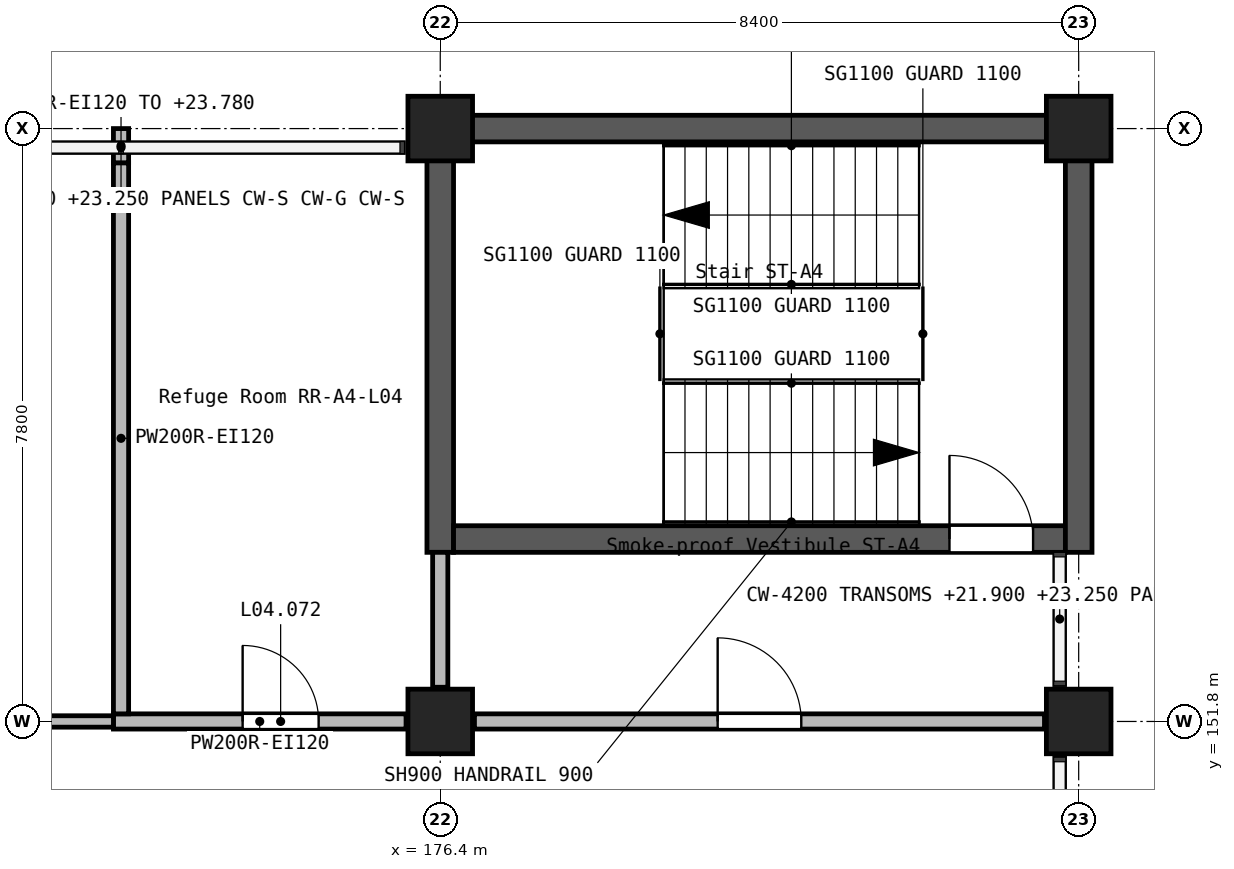
"""IFC4 building model, lengths in metres.
Left out: names, types, materials, properties, quantities, classifications, styles, units other than length and angle.
Written with IfcOpenShell. Run it as: python <this file> out.ifc"""

import sys

from ifc_helpers import new_model, si_unit, direction, frame, frame_2d, origin, origin_2d, place, context, subcontext, project, spatial, rectangle, extrude, element, fill, save


model = new_model("IFC4")
c1 = context("Model", 3, precision=1e-05, world=origin(), true_north=direction((0.0, 1.0)))
c2 = subcontext(c1, "Body", "Model", "MODEL_VIEW")
j1 = project(units=[si_unit("LENGTHUNIT", "METRE"), si_unit("PLANEANGLEUNIT", "RADIAN")], contexts=[c1])
p1 = place(None, origin())
s1 = spatial("IfcSite", under=j1, at=p1, CompositionType="ELEMENT")
p2 = place(p1, origin())
s2 = spatial("IfcBuilding", under=s1, at=p2, CompositionType="ELEMENT")
p3 = place(p2, frame((0.0, 0.0, 21.0)))
s3 = spatial("IfcBuildingStorey", under=s2, at=p3, CompositionType="ELEMENT", Elevation=21.0)
for number, where, z_axis, x_axis in (
    (1, (176.4, 151.8, 0.0), (0.0, 0.0, 1.0), (1.0, 0.0, 0.0)),
    (2, (176.4, 159.6, 0.0), (0.0, 0.0, 1.0), (1.0, 0.0, 0.0)),
    (3, (184.8, 151.8, 0.0), (0.0, 0.0, 1.0), (1.0, 0.0, 0.0)),
    (4, (184.8, 159.6, 0.0), (0.0, 0.0, 1.0), (1.0, 0.0, 0.0)),
):
    element("IfcColumn", number, at=place(p3, frame(where, z_axis=z_axis, x_axis=x_axis)), inside=s3, PredefinedType="COLUMN", context=c2, shape_type="SweptSolid", body=[
        extrude(rectangle(XDim=0.85, YDim=0.85, at=origin_2d()), origin(), (0.0, 0.0, 1.0), 3.9),
    ])
p4 = place(p3, frame((176.225, 159.6, 0.0), z_axis=(0.0, 0.0, 1.0), x_axis=(1.0, 0.0, 0.0)))
e5 = element("IfcWall", 5, at=p4, inside=s3, PredefinedType="SHEAR", context=c2, shape_type="SweptSolid", body=[
    extrude(rectangle(XDim=8.4, YDim=0.35, at=frame_2d((4.2, 0.0))), origin(), (0.0, 0.0, 1.0), 3.9),
])
p5 = place(p3, frame((176.4, 154.025, 0.0), z_axis=(0.0, 0.0, 1.0), x_axis=(0.0, 1.0, 0.0)))
e6 = element("IfcWall", 6, at=p5, inside=s3, PredefinedType="SHEAR", context=c2, shape_type="SweptSolid", body=[
    extrude(rectangle(XDim=5.4, YDim=0.35, at=frame_2d((2.7, 0.0))), origin(), (0.0, 0.0, 1.0), 3.9),
])
p6 = place(p3, frame((176.575, 154.2, 0.0), z_axis=(0.0, 0.0, 1.0), x_axis=(1.0, 0.0, 0.0)))
e7 = element("IfcWall", 7, at=p6, inside=s3, PredefinedType="SHEAR", context=c2, shape_type="SweptSolid", body=[
    extrude(rectangle(XDim=8.05, YDim=0.35, at=frame_2d((4.025, 0.0))), origin(), (0.0, 0.0, 1.0), 3.9),
])
p7 = place(p6, frame((6.525, 0.0, 0.0)))
e8 = element("IfcOpeningElement", 8, at=p7, cuts=e7, PredefinedType="OPENING", context=c2, shape_type="SweptSolid", body=[
    extrude(rectangle(XDim=1.1, YDim=2.1, at=frame_2d((0.55, 1.05))), frame((0.0, 0.185, 0.0), z_axis=(0.0, -1.0, 0.0), x_axis=(1.0, 0.0, 0.0)), (0.0, 0.0, 1.0), 0.37),
])
p8 = place(p3, frame((184.8, 154.025, 0.0), z_axis=(0.0, 0.0, 1.0), x_axis=(0.0, 1.0, 0.0)))
e9 = element("IfcWall", 9, at=p8, inside=s3, PredefinedType="SHEAR", context=c2, shape_type="SweptSolid", body=[
    extrude(rectangle(XDim=5.75, YDim=0.35, at=frame_2d((2.875, 0.0))), origin(), (0.0, 0.0, 1.0), 3.9),
])
p9 = place(p3, frame((172.1, 151.8, 0.0), z_axis=(0.0, 0.0, 1.0), x_axis=(1.0, 0.0, 0.0)))
e10 = element("IfcWall", 10, at=p9, inside=s3, PredefinedType="SOLIDWALL", context=c2, shape_type="SweptSolid", body=[
    extrude(rectangle(XDim=3.85, YDim=0.2, at=frame_2d((1.925, 0.0))), origin(), (0.0, 0.0, 1.0), 3.6),
])
p10 = place(p9, frame((1.7, 0.0, 0.0)))
e11 = element("IfcOpeningElement", 11, at=p10, cuts=e10, PredefinedType="OPENING", context=c2, shape_type="SweptSolid", body=[
    extrude(rectangle(XDim=1.0, YDim=2.1, at=frame_2d((0.5, 1.05))), frame((0.0, 0.11, 0.0), z_axis=(0.0, -1.0, 0.0), x_axis=(1.0, 0.0, 0.0)), (0.0, 0.0, 1.0), 0.22),
])
p11 = place(p3, frame((176.85, 151.8, 0.0), z_axis=(0.0, 0.0, 1.0), x_axis=(1.0, 0.0, 0.0)))
e12 = element("IfcWall", 12, at=p11, inside=s3, PredefinedType="SOLIDWALL", context=c2, shape_type="SweptSolid", body=[
    extrude(rectangle(XDim=7.5, YDim=0.2, at=frame_2d((3.75, 0.0))), origin(), (0.0, 0.0, 1.0), 3.6),
])
p12 = place(p11, frame((3.2, 0.0, 0.0)))
e13 = element("IfcOpeningElement", 13, at=p12, cuts=e12, PredefinedType="OPENING", context=c2, shape_type="SweptSolid", body=[
    extrude(rectangle(XDim=1.1, YDim=2.1, at=frame_2d((0.55, 1.05))), frame((0.0, 0.11, 0.0), z_axis=(0.0, -1.0, 0.0), x_axis=(1.0, 0.0, 0.0)), (0.0, 0.0, 1.0), 0.22),
])
p13 = place(p3, frame((176.4, 152.25, 0.0), z_axis=(0.0, 0.0, 1.0), x_axis=(0.0, 1.0, 0.0)))
e14 = element("IfcWall", 14, at=p13, inside=s3, PredefinedType="SOLIDWALL", context=c2, shape_type="SweptSolid", body=[
    extrude(rectangle(XDim=1.775, YDim=0.2, at=frame_2d((0.887, 0.0))), origin(), (0.0, 0.0, 1.0), 3.6),
])
p14 = place(p3, frame((172.2, 151.9, 0.0), z_axis=(0.0, 0.0, 1.0), x_axis=(0.0, 1.0, 0.0)))
e15 = element("IfcWall", 15, at=p14, inside=s3, PredefinedType="SOLIDWALL", context=c2, shape_type="SweptSolid", body=[
    extrude(rectangle(XDim=7.25, YDim=0.2, at=frame_2d((3.625, 0.0))), origin(), (0.0, 0.0, 1.0), 3.6),
])
p15 = place(p3, frame((172.2, 159.15, 0.0), z_axis=(0.0, 0.0, 1.0), x_axis=(0.0, 1.0, 0.0)))
e16 = element("IfcWall", 16, at=p15, inside=s3, PredefinedType="SOLIDWALL", context=c2, shape_type="SweptSolid", body=[
    extrude(rectangle(XDim=0.45, YDim=0.2, at=frame_2d((0.225, 0.0))), origin(), (0.0, 0.0, 1.0), 2.78),
])
p16 = place(p3, frame((172.1, 151.8, 0.0), z_axis=(0.0, 0.0, 1.0), x_axis=(-1.0, 0.0, 0.0)))
e17 = element("IfcWall", 17, at=p16, inside=s3, PredefinedType="PARTITIONING", context=c2, shape_type="SweptSolid", body=[
    extrude(rectangle(XDim=3.65, YDim=0.15, at=frame_2d((1.825, 0.0))), origin(), (0.0, 0.0, 1.0), 3.6),
])
p17 = place(p16, frame((2.25, 0.0, 0.0)))
e18 = element("IfcOpeningElement", 18, at=p17, cuts=e17, PredefinedType="OPENING", context=c2, shape_type="SweptSolid", body=[
    extrude(rectangle(XDim=1.0, YDim=2.1, at=frame_2d((0.5, 1.05))), frame((0.0, 0.085, 0.0), z_axis=(0.0, -1.0, 0.0), x_axis=(1.0, 0.0, 0.0)), (0.0, 0.0, 1.0), 0.17),
])
p18 = place(p10, origin())
e19 = element("IfcDoor", 19, at=p18, inside=s3, OperationType="SINGLE_SWING_RIGHT", PredefinedType="DOOR", context=c2, shape_type="SweptSolid", body=[
    extrude(rectangle(XDim=1.0, YDim=2.1, at=frame_2d((0.5, 1.05))), frame((0.0, 0.025, 0.0), z_axis=(0.0, -1.0, 0.0), x_axis=(1.0, 0.0, 0.0)), (0.0, 0.0, 1.0), 0.05),
])
fill(e11, e19)
p19 = place(p7, origin())
e20 = element("IfcDoor", 20, at=p19, inside=s3, OperationType="SINGLE_SWING_RIGHT", PredefinedType="DOOR", context=c2, shape_type="SweptSolid", body=[
    extrude(rectangle(XDim=1.1, YDim=2.1, at=frame_2d((0.55, 1.05))), frame((0.0, 0.025, 0.0), z_axis=(0.0, -1.0, 0.0), x_axis=(1.0, 0.0, 0.0)), (0.0, 0.0, 1.0), 0.05),
])
fill(e8, e20)
p20 = place(p12, origin())
e21 = element("IfcDoor", 21, at=p20, inside=s3, OperationType="SINGLE_SWING_RIGHT", PredefinedType="DOOR", context=c2, shape_type="SweptSolid", body=[
    extrude(rectangle(XDim=1.1, YDim=2.1, at=frame_2d((0.55, 1.05))), frame((0.0, 0.025, 0.0), z_axis=(0.0, -1.0, 0.0), x_axis=(1.0, 0.0, 0.0)), (0.0, 0.0, 1.0), 0.05),
])
fill(e13, e21)
save(model, sys.argv[1])
